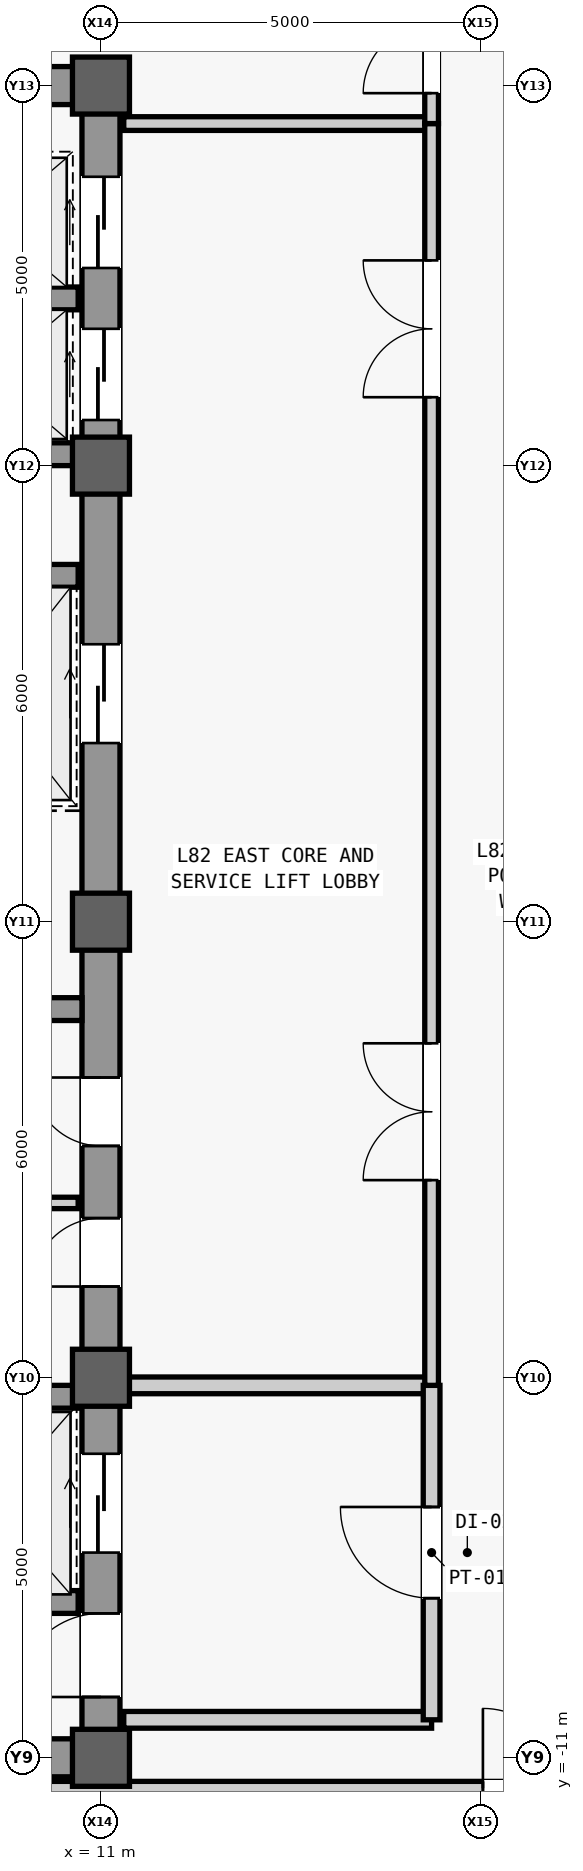
"""IFC4 building model, lengths in metres.
Left out: names, types, materials, properties, quantities, classifications, styles, units other than length and angle.
Written with IfcOpenShell. Run it as: python <this file> out.ifc"""

import sys

from ifc_helpers import new_model, si_unit, direction, frame, frame_2d, origin, origin_2d, place, context, subcontext, project, spatial, rectangle, extrude, source, transform, mapped, element, fill, save


model = new_model("IFC4")
c1 = context("Model", 3, precision=1e-05, world=origin(), true_north=direction((0.0, 1.0)))
c2 = subcontext(c1, "Body", "Model", "MODEL_VIEW")
j1 = project(units=[si_unit("LENGTHUNIT", "METRE"), si_unit("PLANEANGLEUNIT", "RADIAN")], contexts=[c1])
p1 = place(None, origin())
s1 = spatial("IfcSite", under=j1, at=p1, CompositionType="ELEMENT")
p2 = place(p1, origin())
s2 = spatial("IfcBuilding", under=s1, at=p2, CompositionType="ELEMENT")
p3 = place(p2, frame((0.0, 0.0, 346.3)))
s3 = spatial("IfcBuildingStorey", under=s2, at=p3, CompositionType="ELEMENT", Elevation=346.3)
m1 = source(origin(), c2, "Body", "SweptSolid", [
    extrude(rectangle(XDim=22.0, YDim=0.5, at=frame_2d((11.0, 0.0))), origin(), (0.0, 0.0, 1.0), 3.74),
])
p4 = place(p3, frame((11.0, -11.0, 0.0), z_axis=(0.0, 0.0, 1.0), x_axis=(0.0, 1.0, 0.0)))
e1 = element("IfcWall", 1, at=p4, inside=s3, PredefinedType="SHEAR", context=c2, shape_type="MappedRepresentation", body=[
    mapped(m1, transform((0.0, 0.0, 0.0), scale=1.0)),
])
m2 = source(origin(), c2, "Body", "SweptSolid", [
    extrude(rectangle(XDim=1.1, YDim=2.2, at=frame_2d((0.55, 1.1))), frame((0.0, 0.26, 0.0), z_axis=(0.0, -1.0, 0.0), x_axis=(1.0, 0.0, 0.0)), (0.0, 0.0, 1.0), 0.52),
])
p5 = place(p4, frame((0.8, 0.0, 0.0)))
e2 = element("IfcOpeningElement", 2, at=p5, cuts=e1, PredefinedType="OPENING", context=c2, shape_type="MappedRepresentation", body=[
    mapped(m2, transform((0.0, 0.0, 0.0), scale=1.0)),
])
m3 = source(origin(), c2, "Body", "SweptSolid", [
    extrude(rectangle(XDim=0.9, YDim=2.15, at=frame_2d((0.45, 1.075))), frame((0.0, 0.26, 0.0), z_axis=(0.0, -1.0, 0.0), x_axis=(1.0, 0.0, 0.0)), (0.0, 0.0, 1.0), 0.52),
])
p6 = place(p4, frame((6.2, 0.0, 0.0)))
e3 = element("IfcOpeningElement", 3, at=p6, cuts=e1, PredefinedType="OPENING", context=c2, shape_type="MappedRepresentation", body=[
    mapped(m3, transform((0.0, 0.0, 0.0), scale=1.0)),
])
p7 = place(p4, frame((8.05, 0.0, 0.0)))
e4 = element("IfcOpeningElement", 4, at=p7, cuts=e1, PredefinedType="OPENING", context=c2, shape_type="MappedRepresentation", body=[
    mapped(m3, transform((0.0, 0.0, 0.0), scale=1.0)),
])
m4 = source(origin(), c2, "Body", "SweptSolid", [
    extrude(rectangle(XDim=1.2, YDim=2.3, at=frame_2d((0.6, 1.15))), frame((0.0, 0.26, 0.0), z_axis=(0.0, -1.0, 0.0), x_axis=(1.0, 0.0, 0.0)), (0.0, 0.0, 1.0), 0.52),
])
p8 = place(p4, frame((17.6, 0.0, 0.0)))
e5 = element("IfcOpeningElement", 5, at=p8, cuts=e1, PredefinedType="OPENING", context=c2, shape_type="MappedRepresentation", body=[
    mapped(m4, transform((0.0, 0.0, 0.0), scale=1.0)),
])
p9 = place(p4, frame((19.6, 0.0, 0.0)))
e6 = element("IfcOpeningElement", 6, at=p9, cuts=e1, PredefinedType="OPENING", context=c2, shape_type="MappedRepresentation", body=[
    mapped(m4, transform((0.0, 0.0, 0.0), scale=1.0)),
])
m5 = source(origin(), c2, "Body", "SweptSolid", [
    extrude(rectangle(XDim=1.3, YDim=2.3, at=frame_2d((0.65, 1.15))), frame((0.0, 0.26, 0.0), z_axis=(0.0, -1.0, 0.0), x_axis=(1.0, 0.0, 0.0)), (0.0, 0.0, 1.0), 0.52),
])
p10 = place(p4, frame((2.7, 0.0, 0.0)))
e7 = element("IfcOpeningElement", 7, at=p10, cuts=e1, PredefinedType="OPENING", context=c2, shape_type="MappedRepresentation", body=[
    mapped(m5, transform((0.0, 0.0, 0.0), scale=1.0)),
])
p11 = place(p4, frame((13.35, 0.0, 0.0)))
e8 = element("IfcOpeningElement", 8, at=p11, cuts=e1, PredefinedType="OPENING", context=c2, shape_type="MappedRepresentation", body=[
    mapped(m5, transform((0.0, 0.0, 0.0), scale=1.0)),
])
m6 = source(origin(), c2, "Body", "SweptSolid", [
    extrude(rectangle(XDim=5.9, YDim=0.5, at=frame_2d((2.95, 0.0))), origin(), (0.0, 0.0, 1.0), 3.74),
])
p12 = place(p3, frame((4.85, -11.0, 0.0), z_axis=(0.0, 0.0, 1.0), x_axis=(1.0, 0.0, 0.0)))
e9 = element("IfcWall", 9, at=p12, inside=s3, PredefinedType="SHEAR", context=c2, shape_type="MappedRepresentation", body=[
    mapped(m6, transform((0.0, 0.0, 0.0), scale=1.0)),
])
p13 = place(p3, frame((4.85, 11.0, 0.0), z_axis=(0.0, 0.0, 1.0), x_axis=(1.0, 0.0, 0.0)))
e10 = element("IfcWall", 10, at=p13, inside=s3, PredefinedType="SHEAR", context=c2, shape_type="MappedRepresentation", body=[
    mapped(m6, transform((0.0, 0.0, 0.0), scale=1.0)),
])
m7 = source(origin(), c2, "Body", "SweptSolid", [
    extrude(rectangle(XDim=1.05, YDim=2.2, at=frame_2d((0.525, 1.1))), frame((0.0, 0.26, 0.0), z_axis=(0.0, -1.0, 0.0), x_axis=(1.0, 0.0, 0.0)), (0.0, 0.0, 1.0), 0.52),
])
p14 = place(p13, frame((1.375, 0.0, 0.0)))
e11 = element("IfcOpeningElement", 11, at=p14, cuts=e10, PredefinedType="OPENING", context=c2, shape_type="MappedRepresentation", body=[
    mapped(m7, transform((0.0, 0.0, 0.0), scale=1.0)),
])
m8 = source(origin(), c2, "Body", "SweptSolid", [
    extrude(rectangle(XDim=5.65, YDim=0.3, at=frame_2d((2.825, 0.0))), origin(), (0.0, 0.0, 1.0), 3.74),
])
p15 = place(p3, frame((5.1, -1.15, 0.0), z_axis=(0.0, 0.0, 1.0), x_axis=(1.0, 0.0, 0.0)))
e12 = element("IfcWall", 12, at=p15, inside=s3, PredefinedType="SHEAR", context=c2, shape_type="MappedRepresentation", body=[
    mapped(m8, transform((0.0, 0.0, 0.0), scale=1.0)),
])
m9 = source(origin(), c2, "Body", "SweptSolid", [
    extrude(rectangle(XDim=0.75, YDim=0.75, at=origin_2d()), origin(), (0.0, 0.0, 1.0), 4.0),
])
for number, where, z_axis, x_axis in (
    (13, (11.0, -11.0, 0.0), (0.0, 0.0, 1.0), (1.0, 0.0, 0.0)),
    (14, (11.0, -6.0, 0.0), (0.0, 0.0, 1.0), (1.0, 0.0, 0.0)),
    (15, (11.0, 0.0, 0.0), (0.0, 0.0, 1.0), (1.0, 0.0, 0.0)),
    (16, (11.0, 6.0, 0.0), (0.0, 0.0, 1.0), (1.0, 0.0, 0.0)),
    (17, (11.0, 11.0, 0.0), (0.0, 0.0, 1.0), (1.0, 0.0, 0.0)),
):
    element("IfcColumn", number, at=place(p3, frame(where, z_axis=z_axis, x_axis=x_axis)), inside=s3, PredefinedType="COLUMN", context=c2, shape_type="MappedRepresentation", body=[
        mapped(m9, transform((0.0, 0.0, 0.0), scale=1.0)),
    ])
m10 = source(origin(), c2, "Body", "SweptSolid", [
    extrude(rectangle(XDim=2.2, YDim=0.3, at=frame_2d((1.1, 0.0))), origin(), (0.0, 0.0, 1.0), 3.74),
])
for number, where, z_axis, x_axis in (
    (18, (8.5, -8.95, 0.0), (0.0, 0.0, 1.0), (1.0, 0.0, 0.0)),
    (19, (8.5, -6.25, 0.0), (0.0, 0.0, 1.0), (1.0, 0.0, 0.0)),
):
    element("IfcWall", number, at=place(p3, frame(where, z_axis=z_axis, x_axis=x_axis)), inside=s3, PredefinedType="SHEAR", context=c2, shape_type="MappedRepresentation", body=[
        mapped(m10, transform((0.0, 0.0, 0.0), scale=1.0)),
    ])
m11 = source(origin(), c2, "Body", "SweptSolid", [
    extrude(rectangle(XDim=2.3, YDim=0.3, at=frame_2d((1.15, 0.0))), origin(), (0.0, 0.0, 1.0), 3.74),
])
for number, where, z_axis, x_axis in (
    (20, (8.4, 4.55, 0.0), (0.0, 0.0, 1.0), (1.0, 0.0, 0.0)),
    (21, (8.4, 6.15, 0.0), (0.0, 0.0, 1.0), (1.0, 0.0, 0.0)),
    (22, (8.4, 8.2, 0.0), (0.0, 0.0, 1.0), (1.0, 0.0, 0.0)),
):
    element("IfcWall", number, at=place(p3, frame(where, z_axis=z_axis, x_axis=x_axis)), inside=s3, PredefinedType="SHEAR", context=c2, shape_type="MappedRepresentation", body=[
        mapped(m11, transform((0.0, 0.0, 0.0), scale=1.0)),
    ])
m12 = source(origin(), c2, "Body", "SweptSolid", [
    extrude(rectangle(XDim=2.05, YDim=0.15, at=frame_2d((1.025, 0.0))), origin(), (0.0, 0.0, 1.0), 3.74),
])
p16 = place(p3, frame((8.65, -3.7, 0.0), z_axis=(0.0, 0.0, 1.0), x_axis=(1.0, 0.0, 0.0)))
e23 = element("IfcWall", 23, at=p16, inside=s3, PredefinedType="PARTITIONING", context=c2, shape_type="MappedRepresentation", body=[
    mapped(m12, transform((0.0, 0.0, 0.0), scale=1.0)),
])
m13 = source(origin(), c2, "Body", "SweptSolid", [
    extrude(rectangle(XDim=4.05, YDim=0.22, at=frame_2d((2.025, 0.0))), origin(), (0.0, 0.0, 1.0), 3.74),
])
p17 = place(p3, frame((11.3, -10.5, 0.0), z_axis=(0.0, 0.0, 1.0), x_axis=(1.0, 0.0, 0.0)))
e24 = element("IfcWall", 24, at=p17, inside=s3, PredefinedType="PARTITIONING", context=c2, shape_type="MappedRepresentation", body=[
    mapped(m13, transform((0.0, 0.0, 0.0), scale=1.0)),
])
m14 = source(origin(), c2, "Body", "SweptSolid", [
    extrude(rectangle(XDim=4.05, YDim=0.22, at=frame_2d((2.025, 0.0))), origin(), (0.0, 0.0, 1.0), 3.124),
])
p18 = place(p3, frame((11.3, -6.1, 0.0), z_axis=(0.0, 0.0, 1.0), x_axis=(1.0, 0.0, 0.0)))
e25 = element("IfcWall", 25, at=p18, inside=s3, PredefinedType="PARTITIONING", context=c2, shape_type="MappedRepresentation", body=[
    mapped(m14, transform((0.0, 0.0, 0.0), scale=1.0)),
])
m15 = source(origin(), c2, "Body", "SweptSolid", [
    extrude(rectangle(XDim=4.4, YDim=0.22, at=frame_2d((2.2, 0.0))), origin(), (0.0, 0.0, 1.0), 3.74),
])
p19 = place(p3, frame((15.35, -10.5, 0.0), z_axis=(0.0, 0.0, 1.0), x_axis=(0.0, 1.0, 0.0)))
e26 = element("IfcWall", 26, at=p19, inside=s3, PredefinedType="PARTITIONING", context=c2, shape_type="MappedRepresentation", body=[
    mapped(m15, transform((0.0, 0.0, 0.0), scale=1.0)),
])
m16 = source(origin(), c2, "Body", "SweptSolid", [
    extrude(rectangle(XDim=1.2, YDim=2.2, at=frame_2d((0.6, 1.1))), frame((0.0, 0.12, 0.0), z_axis=(0.0, -1.0, 0.0), x_axis=(1.0, 0.0, 0.0)), (0.0, 0.0, 1.0), 0.24),
])
p20 = place(p19, frame((1.6, 0.0, 0.0)))
e27 = element("IfcOpeningElement", 27, at=p20, cuts=e26, PredefinedType="OPENING", context=c2, shape_type="MappedRepresentation", body=[
    mapped(m16, transform((0.0, 0.0, 0.0), scale=1.0)),
])
m17 = source(origin(), c2, "Body", "SweptSolid", [
    extrude(rectangle(XDim=4.05, YDim=0.18, at=frame_2d((2.025, 0.0))), origin(), (0.0, 0.0, 1.0), 3.74),
])
p21 = place(p3, frame((11.3, 10.5, 0.0), z_axis=(0.0, 0.0, 1.0), x_axis=(1.0, 0.0, 0.0)))
e28 = element("IfcWall", 28, at=p21, inside=s3, PredefinedType="PARTITIONING", context=c2, shape_type="MappedRepresentation", body=[
    mapped(m17, transform((0.0, 0.0, 0.0), scale=1.0)),
])
m18 = source(origin(), c2, "Body", "SweptSolid", [
    extrude(rectangle(XDim=16.6, YDim=0.18, at=frame_2d((8.3, 0.0))), origin(), (0.0, 0.0, 1.0), 3.74),
])
p22 = place(p3, frame((15.35, -6.1, 0.0), z_axis=(0.0, 0.0, 1.0), x_axis=(0.0, 1.0, 0.0)))
e29 = element("IfcWall", 29, at=p22, inside=s3, PredefinedType="PARTITIONING", context=c2, shape_type="MappedRepresentation", body=[
    mapped(m18, transform((0.0, 0.0, 0.0), scale=1.0)),
])
m19 = source(origin(), c2, "Body", "SweptSolid", [
    extrude(rectangle(XDim=1.8, YDim=2.25, at=frame_2d((0.9, 1.125))), frame((0.0, 0.1, 0.0), z_axis=(0.0, -1.0, 0.0), x_axis=(1.0, 0.0, 0.0)), (0.0, 0.0, 1.0), 0.2),
])
p23 = place(p22, frame((2.7, 0.0, 0.0)))
e30 = element("IfcOpeningElement", 30, at=p23, cuts=e29, PredefinedType="OPENING", context=c2, shape_type="MappedRepresentation", body=[
    mapped(m19, transform((0.0, 0.0, 0.0), scale=1.0)),
])
p24 = place(p22, frame((13.0, 0.0, 0.0)))
e31 = element("IfcOpeningElement", 31, at=p24, cuts=e29, PredefinedType="OPENING", context=c2, shape_type="MappedRepresentation", body=[
    mapped(m19, transform((0.0, 0.0, 0.0), scale=1.0)),
])
m20 = source(origin(), c2, "Body", "SweptSolid", [
    extrude(rectangle(XDim=2.6, YDim=0.18, at=frame_2d((1.3, 0.0))), origin(), (0.0, 0.0, 1.0), 3.74),
])
p25 = place(p3, frame((15.35, 10.5, 0.0), z_axis=(0.0, 0.0, 1.0), x_axis=(0.0, 1.0, 0.0)))
e32 = element("IfcWall", 32, at=p25, inside=s3, PredefinedType="PARTITIONING", context=c2, shape_type="MappedRepresentation", body=[
    mapped(m20, transform((0.0, 0.0, 0.0), scale=1.0)),
])
p26 = place(p25, frame((0.4, 0.0, 0.0)))
e33 = element("IfcOpeningElement", 33, at=p26, cuts=e32, PredefinedType="OPENING", context=c2, shape_type="MappedRepresentation", body=[
    mapped(m19, transform((0.0, 0.0, 0.0), scale=1.0)),
])
m21 = source(origin(), c2, "Body", "SweptSolid", [
    extrude(rectangle(XDim=12.7, YDim=0.18, at=frame_2d((6.35, 0.0))), origin(), (0.0, 0.0, 1.0), 2.79),
])
p27 = place(p3, frame((5.05, -11.4, 0.0), z_axis=(0.0, 0.0, 1.0), x_axis=(1.0, 0.0, 0.0)))
e34 = element("IfcWall", 34, at=p27, inside=s3, PredefinedType="PARTITIONING", context=c2, shape_type="MappedRepresentation", body=[
    mapped(m21, transform((0.0, 0.0, 0.0), scale=1.0)),
])
m22 = source(origin(), c2, "Body", "SweptSolid", [
    extrude(rectangle(XDim=1.05, YDim=2.2, at=frame_2d((0.525, 1.1))), frame((0.0, 0.1, 0.0), z_axis=(0.0, -1.0, 0.0), x_axis=(1.0, 0.0, 0.0)), (0.0, 0.0, 1.0), 0.2),
])
p28 = place(p27, frame((10.975, 0.0, 0.0)))
e35 = element("IfcOpeningElement", 35, at=p28, cuts=e34, PredefinedType="OPENING", context=c2, shape_type="MappedRepresentation", body=[
    mapped(m22, transform((0.0, 0.0, 0.0), scale=1.0)),
])
m23 = source(origin(), c2, "Body", "SweptSolid", [
    extrude(rectangle(XDim=1.1, YDim=2.2, at=frame_2d((0.55, 1.1))), frame((0.0, 0.025, 0.0), z_axis=(0.0, -1.0, 0.0), x_axis=(1.0, 0.0, 0.0)), (0.0, 0.0, 1.0), 0.05),
])
p29 = place(p5, origin())
e36 = element("IfcDoor", 36, at=p29, inside=s3, OperationType="SINGLE_SWING_LEFT", PredefinedType="DOOR", context=c2, shape_type="MappedRepresentation", body=[
    mapped(m23, transform((0.0, 0.0, 0.0), scale=1.0)),
])
fill(e2, e36)
m24 = source(origin(), c2, "Body", "SweptSolid", [
    extrude(rectangle(XDim=0.9, YDim=2.15, at=frame_2d((0.45, 1.075))), frame((0.0, 0.025, 0.0), z_axis=(0.0, -1.0, 0.0), x_axis=(1.0, 0.0, 0.0)), (0.0, 0.0, 1.0), 0.05),
])
p30 = place(p6, origin())
e37 = element("IfcDoor", 37, at=p30, inside=s3, OperationType="SINGLE_SWING_LEFT", PredefinedType="DOOR", context=c2, shape_type="MappedRepresentation", body=[
    mapped(m24, transform((0.0, 0.0, 0.0), scale=1.0)),
])
fill(e3, e37)
p31 = place(p7, origin())
e38 = element("IfcDoor", 38, at=p31, inside=s3, OperationType="SINGLE_SWING_RIGHT", PredefinedType="DOOR", context=c2, shape_type="MappedRepresentation", body=[
    mapped(m24, transform((0.0, 0.0, 0.0), scale=1.0)),
])
fill(e4, e38)
m25 = source(origin(), c2, "Body", "SweptSolid", [
    extrude(rectangle(XDim=1.2, YDim=2.2, at=frame_2d((0.6, 1.1))), frame((0.0, 0.025, 0.0), z_axis=(0.0, -1.0, 0.0), x_axis=(1.0, 0.0, 0.0)), (0.0, 0.0, 1.0), 0.05),
])
p32 = place(p20, origin())
e39 = element("IfcDoor", 39, at=p32, inside=s3, OperationType="SINGLE_SWING_RIGHT", PredefinedType="DOOR", context=c2, shape_type="MappedRepresentation", body=[
    mapped(m25, transform((0.0, 0.0, 0.0), scale=1.0)),
])
fill(e27, e39)
m26 = source(origin(), c2, "Body", "SweptSolid", [
    extrude(rectangle(XDim=1.8, YDim=2.25, at=frame_2d((0.9, 1.125))), frame((0.0, 0.025, 0.0), z_axis=(0.0, -1.0, 0.0), x_axis=(1.0, 0.0, 0.0)), (0.0, 0.0, 1.0), 0.05),
])
p33 = place(p23, origin())
e40 = element("IfcDoor", 40, at=p33, inside=s3, OperationType="SINGLE_SWING_RIGHT", PredefinedType="DOOR", context=c2, shape_type="MappedRepresentation", body=[
    mapped(m26, transform((0.0, 0.0, 0.0), scale=1.0)),
])
fill(e30, e40)
p34 = place(p24, origin())
e41 = element("IfcDoor", 41, at=p34, inside=s3, OperationType="SINGLE_SWING_LEFT", PredefinedType="DOOR", context=c2, shape_type="MappedRepresentation", body=[
    mapped(m26, transform((0.0, 0.0, 0.0), scale=1.0)),
])
fill(e31, e41)
p35 = place(p26, origin())
e42 = element("IfcDoor", 42, at=p35, inside=s3, OperationType="DOUBLE_DOOR_SINGLE_SWING", PredefinedType="DOOR", context=c2, shape_type="MappedRepresentation", body=[
    mapped(m26, transform((0.0, 0.0, 0.0), scale=1.0)),
])
fill(e33, e42)
m27 = source(origin(), c2, "Body", "SweptSolid", [
    extrude(rectangle(XDim=1.05, YDim=2.2, at=frame_2d((0.525, 1.1))), frame((0.0, 0.025, 0.0), z_axis=(0.0, -1.0, 0.0), x_axis=(1.0, 0.0, 0.0)), (0.0, 0.0, 1.0), 0.05),
])
p36 = place(p28, origin())
e43 = element("IfcDoor", 43, at=p36, inside=s3, OperationType="SINGLE_SWING_LEFT", PredefinedType="DOOR", context=c2, shape_type="MappedRepresentation", body=[
    mapped(m27, transform((0.0, 0.0, 0.0), scale=1.0)),
])
fill(e35, e43)
m28 = source(origin(), c2, "Body", "SweptSolid", [
    extrude(rectangle(XDim=1.2, YDim=2.3, at=frame_2d((0.6, 1.15))), frame((0.0, 0.025, 0.0), z_axis=(0.0, -1.0, 0.0), x_axis=(1.0, 0.0, 0.0)), (0.0, 0.0, 1.0), 0.05),
])
p37 = place(p8, origin())
e44 = element("IfcDoor", 44, at=p37, inside=s3, OperationType="SLIDING_TO_LEFT", PredefinedType="DOOR", context=c2, shape_type="MappedRepresentation", body=[
    mapped(m28, transform((0.0, 0.0, 0.0), scale=1.0)),
])
fill(e5, e44)
p38 = place(p9, origin())
e45 = element("IfcDoor", 45, at=p38, inside=s3, OperationType="SLIDING_TO_LEFT", PredefinedType="DOOR", context=c2, shape_type="MappedRepresentation", body=[
    mapped(m28, transform((0.0, 0.0, 0.0), scale=1.0)),
])
fill(e6, e45)
m29 = source(origin(), c2, "Body", "SweptSolid", [
    extrude(rectangle(XDim=1.3, YDim=2.3, at=frame_2d((0.65, 1.15))), frame((0.0, 0.025, 0.0), z_axis=(0.0, -1.0, 0.0), x_axis=(1.0, 0.0, 0.0)), (0.0, 0.0, 1.0), 0.05),
])
p39 = place(p10, origin())
e46 = element("IfcDoor", 46, at=p39, inside=s3, OperationType="SLIDING_TO_LEFT", PredefinedType="DOOR", context=c2, shape_type="MappedRepresentation", body=[
    mapped(m29, transform((0.0, 0.0, 0.0), scale=1.0)),
])
fill(e7, e46)
p40 = place(p11, origin())
e47 = element("IfcDoor", 47, at=p40, inside=s3, OperationType="SLIDING_TO_LEFT", PredefinedType="DOOR", context=c2, shape_type="MappedRepresentation", body=[
    mapped(m29, transform((0.0, 0.0, 0.0), scale=1.0)),
])
fill(e8, e47)
save(model, sys.argv[1])
